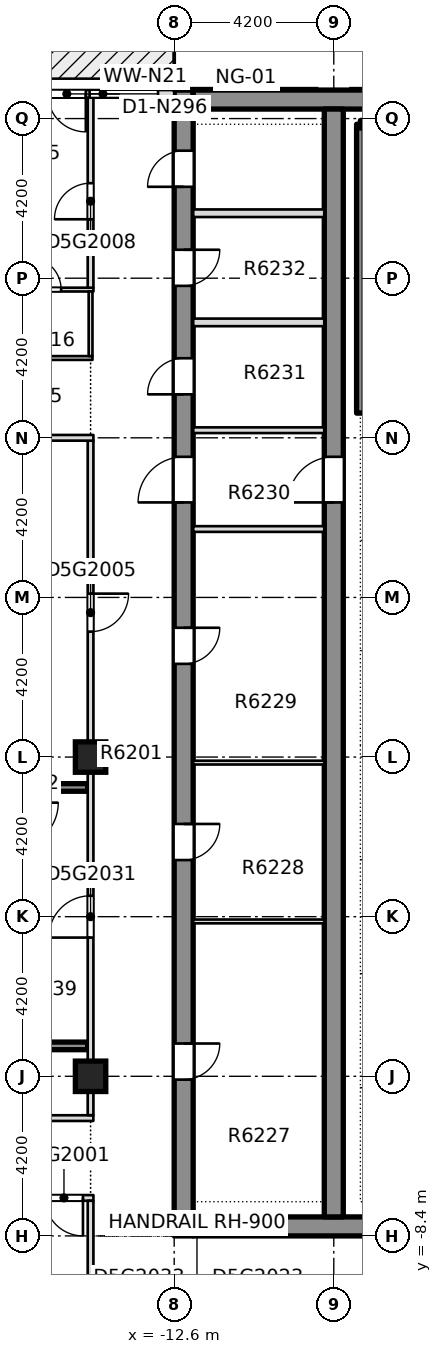
"""IFC4 building model, lengths in metres.
Left out: names, types, materials, properties, quantities, classifications, styles, units other than length and angle.
Written with IfcOpenShell. Run it as: python <this file> out.ifc"""

import sys

from ifc_helpers import new_model, si_unit, direction, frame, frame_2d, origin, origin_2d, place, context, subcontext, project, spatial, rectangle, extrude, element, fill, save


model = new_model("IFC4")
c1 = context("Model", 3, precision=1e-05, world=origin(), true_north=direction((0.0, 1.0)))
c2 = subcontext(c1, "Body", "Model", "MODEL_VIEW")
j1 = project(units=[si_unit("LENGTHUNIT", "METRE"), si_unit("PLANEANGLEUNIT", "RADIAN")], contexts=[c1])
p1 = place(None, origin())
s1 = spatial("IfcSite", under=j1, at=p1, CompositionType="ELEMENT")
p2 = place(p1, origin())
s2 = spatial("IfcBuilding", under=s1, at=p2, CompositionType="ELEMENT")
p3 = place(p2, frame((0.0, 0.0, 237.25)))
s3 = spatial("IfcBuildingStorey", under=s2, at=p3, CompositionType="ELEMENT", Elevation=237.25)
p4 = place(p3, frame((-12.35, -8.4, -0.4), z_axis=(0.0, 0.0, 1.0), x_axis=(0.0, 1.0, 0.0)))
e1 = element("IfcWall", 1, at=p4, inside=s3, PredefinedType="SHEAR", context=c2, shape_type="SweptSolid", body=[
    extrude(rectangle(XDim=30.15, YDim=0.5, at=frame_2d((15.075, 0.0))), origin(), (0.0, 0.0, 1.0), 3.45),
])
p5 = place(p4, frame((4.113, 0.0, 0.4)))
e2 = element("IfcOpeningElement", 2, at=p5, cuts=e1, PredefinedType="OPENING", context=c2, shape_type="SweptSolid", body=[
    extrude(rectangle(XDim=0.95, YDim=2.1, at=frame_2d((0.475, 1.05))), frame((0.0, 0.26, 0.0), z_axis=(0.0, -1.0, 0.0), x_axis=(1.0, 0.0, 0.0)), (0.0, 0.0, 1.0), 0.52),
])
p6 = place(p4, frame((9.89, 0.0, 0.4)))
e3 = element("IfcOpeningElement", 3, at=p6, cuts=e1, PredefinedType="OPENING", context=c2, shape_type="SweptSolid", body=[
    extrude(rectangle(XDim=0.95, YDim=2.1, at=frame_2d((0.475, 1.05))), frame((0.0, 0.26, 0.0), z_axis=(0.0, -1.0, 0.0), x_axis=(1.0, 0.0, 0.0)), (0.0, 0.0, 1.0), 0.52),
])
p7 = place(p4, frame((15.052, 0.0, 0.4)))
e4 = element("IfcOpeningElement", 4, at=p7, cuts=e1, PredefinedType="OPENING", context=c2, shape_type="SweptSolid", body=[
    extrude(rectangle(XDim=0.95, YDim=2.1, at=frame_2d((0.475, 1.05))), frame((0.0, 0.26, 0.0), z_axis=(0.0, -1.0, 0.0), x_axis=(1.0, 0.0, 0.0)), (0.0, 0.0, 1.0), 0.52),
])
p8 = place(p4, frame((22.144, 0.0, 0.4)))
e5 = element("IfcOpeningElement", 5, at=p8, cuts=e1, PredefinedType="OPENING", context=c2, shape_type="SweptSolid", body=[
    extrude(rectangle(XDim=0.95, YDim=2.1, at=frame_2d((0.475, 1.05))), frame((0.0, 0.26, 0.0), z_axis=(0.0, -1.0, 0.0), x_axis=(1.0, 0.0, 0.0)), (0.0, 0.0, 1.0), 0.52),
])
p9 = place(p4, frame((24.998, 0.0, 0.4)))
e6 = element("IfcOpeningElement", 6, at=p9, cuts=e1, PredefinedType="OPENING", context=c2, shape_type="SweptSolid", body=[
    extrude(rectangle(XDim=0.95, YDim=2.1, at=frame_2d((0.475, 1.05))), frame((0.0, 0.26, 0.0), z_axis=(0.0, -1.0, 0.0), x_axis=(1.0, 0.0, 0.0)), (0.0, 0.0, 1.0), 0.52),
])
p10 = place(p4, frame((27.605, 0.0, 0.4)))
e7 = element("IfcOpeningElement", 7, at=p10, cuts=e1, PredefinedType="OPENING", context=c2, shape_type="SweptSolid", body=[
    extrude(rectangle(XDim=0.95, YDim=2.1, at=frame_2d((0.475, 1.05))), frame((0.0, 0.26, 0.0), z_axis=(0.0, -1.0, 0.0), x_axis=(1.0, 0.0, 0.0)), (0.0, 0.0, 1.0), 0.52),
])
p11 = place(p4, frame((19.3, 0.0, 0.4)))
e8 = element("IfcOpeningElement", 8, at=p11, cuts=e1, PredefinedType="OPENING", context=c2, shape_type="SweptSolid", body=[
    extrude(rectangle(XDim=1.2, YDim=2.1, at=frame_2d((0.6, 1.05))), frame((0.0, 0.26, 0.0), z_axis=(0.0, -1.0, 0.0), x_axis=(1.0, 0.0, 0.0)), (0.0, 0.0, 1.0), 0.52),
])
p12 = place(p3, frame((-12.1, -8.15, -0.4), z_axis=(0.0, 0.0, 1.0), x_axis=(1.0, 0.0, 0.0)))
e9 = element("IfcWall", 9, at=p12, inside=s3, PredefinedType="SHEAR", context=c2, shape_type="SweptSolid", body=[
    extrude(rectangle(XDim=24.2, YDim=0.5, at=frame_2d((12.1, 0.0))), origin(), (0.0, 0.0, 1.0), 3.45),
])
p13 = place(p12, frame((7.35, 0.0, 0.4)))
e10 = element("IfcOpeningElement", 10, at=p13, cuts=e9, PredefinedType="OPENING", context=c2, shape_type="SweptSolid", body=[
    extrude(rectangle(XDim=1.8, YDim=2.1, at=frame_2d((0.9, 1.05))), frame((0.0, 0.26, 0.0), z_axis=(0.0, -1.0, 0.0), x_axis=(1.0, 0.0, 0.0)), (0.0, 0.0, 1.0), 0.52),
])
p14 = place(p12, frame((15.05, 0.0, 0.4)))
e11 = element("IfcOpeningElement", 11, at=p14, cuts=e9, PredefinedType="OPENING", context=c2, shape_type="SweptSolid", body=[
    extrude(rectangle(XDim=1.8, YDim=2.1, at=frame_2d((0.9, 1.05))), frame((0.0, 0.26, 0.0), z_axis=(0.0, -1.0, 0.0), x_axis=(1.0, 0.0, 0.0)), (0.0, 0.0, 1.0), 0.52),
])
p15 = place(p3, frame((-12.1, 21.5, -0.4), z_axis=(0.0, 0.0, 1.0), x_axis=(1.0, 0.0, 0.0)))
e12 = element("IfcWall", 12, at=p15, inside=s3, PredefinedType="SHEAR", context=c2, shape_type="SweptSolid", body=[
    extrude(rectangle(XDim=24.2, YDim=0.5, at=frame_2d((12.1, 0.0))), origin(), (0.0, 0.0, 1.0), 3.45),
])
p16 = place(p3, frame((-8.4, -7.9, -0.4), z_axis=(0.0, 0.0, 1.0), x_axis=(0.0, 1.0, 0.0)))
e13 = element("IfcWall", 13, at=p16, inside=s3, PredefinedType="SHEAR", context=c2, shape_type="SweptSolid", body=[
    extrude(rectangle(XDim=29.15, YDim=0.5, at=frame_2d((14.575, 0.0))), origin(), (0.0, 0.0, 1.0), 3.45),
])
p17 = place(p16, frame((18.8, 0.0, 0.4)))
e14 = element("IfcOpeningElement", 14, at=p17, cuts=e13, PredefinedType="OPENING", context=c2, shape_type="SweptSolid", body=[
    extrude(rectangle(XDim=1.2, YDim=2.1, at=frame_2d((0.6, 1.05))), frame((0.0, 0.26, 0.0), z_axis=(0.0, -1.0, 0.0), x_axis=(1.0, 0.0, 0.0)), (0.0, 0.0, 1.0), 0.52),
])
for number, where, z_axis, x_axis in (
    (15, (-14.8, -4.2, -0.4), (0.0, 0.0, 1.0), (1.0, 0.0, 0.0)),
    (16, (-14.8, 4.2, -0.4), (0.0, 0.0, 1.0), (1.0, 0.0, 0.0)),
):
    element("IfcColumn", number, at=place(p3, frame(where, z_axis=z_axis, x_axis=x_axis)), inside=s3, PredefinedType="COLUMN", context=c2, shape_type="SweptSolid", body=[
        extrude(rectangle(XDim=0.8, YDim=0.8, at=origin_2d()), origin(), (0.0, 0.0, 1.0), 3.45),
    ])
p18 = place(p3, frame((-25.75, -7.4, 0.0), z_axis=(0.0, 0.0, 1.0), x_axis=(1.0, 0.0, 0.0)))
e17 = element("IfcWall", 17, at=p18, inside=s3, PredefinedType="PARTITIONING", context=c2, shape_type="SweptSolid", body=[
    extrude(rectangle(XDim=11.025, YDim=0.15, at=frame_2d((5.512, 0.0))), origin(), (0.0, 0.0, 1.0), 3.05),
])
p19 = place(p18, frame((9.75, 0.0, 0.0)))
e18 = element("IfcOpeningElement", 18, at=p19, cuts=e17, PredefinedType="OPENING", context=c2, shape_type="SweptSolid", body=[
    extrude(rectangle(XDim=1.0, YDim=2.1, at=frame_2d((0.5, 1.05))), frame((0.0, 0.085, 0.0), z_axis=(0.0, -1.0, 0.0), x_axis=(1.0, 0.0, 0.0)), (0.0, 0.0, 1.0), 0.17),
])
p20 = place(p3, frame((-25.75, -5.3, 0.0), z_axis=(0.0, 0.0, 1.0), x_axis=(1.0, 0.0, 0.0)))
e19 = element("IfcWall", 19, at=p20, inside=s3, PredefinedType="PARTITIONING", context=c2, shape_type="SweptSolid", body=[
    extrude(rectangle(XDim=11.023, YDim=0.15, at=frame_2d((5.511, 0.0))), origin(), (0.0, 0.0, 1.0), 3.05),
])
p21 = place(p3, frame((-20.4, -3.4, 0.0), z_axis=(0.0, 0.0, 1.0), x_axis=(1.0, 0.0, 0.0)))
e20 = element("IfcWall", 20, at=p21, inside=s3, PredefinedType="SOLIDWALL", context=c2, shape_type="SweptSolid", body=[
    extrude(rectangle(XDim=5.523, YDim=0.2, at=frame_2d((2.761, 0.0))), origin(), (0.0, 0.0, 1.0), 3.05),
])
p22 = place(p3, frame((-20.45, 3.4, 0.0), z_axis=(0.0, 0.0, 1.0), x_axis=(1.0, 0.0, 0.0)))
e21 = element("IfcWall", 21, at=p22, inside=s3, PredefinedType="SOLIDWALL", context=c2, shape_type="SweptSolid", body=[
    extrude(rectangle(XDim=5.575, YDim=0.2, at=frame_2d((2.788, 0.0))), origin(), (0.0, 0.0, 1.0), 3.05),
])
p23 = place(p3, frame((-17.25, 14.7, 0.0), z_axis=(0.0, 0.0, 1.0), x_axis=(1.0, 0.0, 0.0)))
e22 = element("IfcWall", 22, at=p23, inside=s3, PredefinedType="PARTITIONING", context=c2, shape_type="SweptSolid", body=[
    extrude(rectangle(XDim=2.5, YDim=0.1, at=frame_2d((1.25, 0.0))), origin(), (0.0, 0.0, 1.0), 3.05),
])
p24 = place(p3, frame((-17.25, 16.5, 0.0), z_axis=(0.0, 0.0, 1.0), x_axis=(1.0, 0.0, 0.0)))
e23 = element("IfcWall", 23, at=p24, inside=s3, PredefinedType="PARTITIONING", context=c2, shape_type="SweptSolid", body=[
    extrude(rectangle(XDim=2.525, YDim=0.1, at=frame_2d((1.262, 0.0))), origin(), (0.0, 0.0, 1.0), 3.05),
])
p25 = place(p24, frame((0.825, 0.0, 0.0)))
e24 = element("IfcOpeningElement", 24, at=p25, cuts=e23, PredefinedType="OPENING", context=c2, shape_type="SweptSolid", body=[
    extrude(rectangle(XDim=0.85, YDim=2.1, at=frame_2d((0.425, 1.05))), frame((0.0, 0.06, 0.0), z_axis=(0.0, -1.0, 0.0), x_axis=(1.0, 0.0, 0.0)), (0.0, 0.0, 1.0), 0.12),
])
p26 = place(p3, frame((-14.8, -10.525, 0.0), z_axis=(0.0, 0.0, 1.0), x_axis=(0.0, 1.0, 0.0)))
e25 = element("IfcWall", 25, at=p26, inside=s3, PredefinedType="PARTITIONING", context=c2, shape_type="SweptSolid", body=[
    extrude(rectangle(XDim=3.05, YDim=0.15, at=frame_2d((1.525, 0.0))), origin(), (0.0, 0.0, 1.0), 3.05),
])
p27 = place(p3, frame((-14.8, -5.223, 0.0), z_axis=(0.0, 0.0, 1.0), x_axis=(0.0, 1.0, 0.0)))
e26 = element("IfcWall", 26, at=p27, inside=s3, PredefinedType="PARTITIONING", context=c2, shape_type="SweptSolid", body=[
    extrude(rectangle(XDim=17.748, YDim=0.15, at=frame_2d((8.874, 0.0))), origin(), (0.0, 0.0, 1.0), 3.05),
])
p28 = place(p27, frame((12.723, 0.0, 0.0)))
e27 = element("IfcOpeningElement", 27, at=p28, cuts=e26, PredefinedType="OPENING", context=c2, shape_type="SweptSolid", body=[
    extrude(rectangle(XDim=1.0, YDim=2.1, at=frame_2d((0.5, 1.05))), frame((0.0, 0.085, 0.0), z_axis=(0.0, -1.0, 0.0), x_axis=(1.0, 0.0, 0.0)), (0.0, 0.0, 1.0), 0.17),
])
p29 = place(p27, frame((4.673, 0.0, 0.0)))
e28 = element("IfcOpeningElement", 28, at=p29, cuts=e26, PredefinedType="OPENING", context=c2, shape_type="SweptSolid", body=[
    extrude(rectangle(XDim=1.1, YDim=2.1, at=frame_2d((0.55, 1.05))), frame((0.0, 0.085, 0.0), z_axis=(0.0, -1.0, 0.0), x_axis=(1.0, 0.0, 0.0)), (0.0, 0.0, 1.0), 0.17),
])
p30 = place(p3, frame((-14.8, 14.75, 0.0), z_axis=(0.0, 0.0, 1.0), x_axis=(0.0, 1.0, 0.0)))
e29 = element("IfcWall", 29, at=p30, inside=s3, PredefinedType="PARTITIONING", context=c2, shape_type="SweptSolid", body=[
    extrude(rectangle(XDim=1.7, YDim=0.1, at=frame_2d((0.85, 0.0))), origin(), (0.0, 0.0, 1.0), 3.05),
])
p31 = place(p3, frame((-14.8, 16.55, 0.0), z_axis=(0.0, 0.0, 1.0), x_axis=(0.0, 1.0, 0.0)))
e30 = element("IfcWall", 30, at=p31, inside=s3, PredefinedType="PARTITIONING", context=c2, shape_type="SweptSolid", body=[
    extrude(rectangle(XDim=5.0, YDim=0.15, at=frame_2d((2.5, 0.0))), origin(), (0.0, 0.0, 1.0), 3.05),
])
p32 = place(p31, frame((1.8, 0.0, 0.0)))
e31 = element("IfcOpeningElement", 31, at=p32, cuts=e30, PredefinedType="OPENING", context=c2, shape_type="SweptSolid", body=[
    extrude(rectangle(XDim=0.95, YDim=2.1, at=frame_2d((0.475, 1.05))), frame((0.0, 0.085, 0.0), z_axis=(0.0, -1.0, 0.0), x_axis=(1.0, 0.0, 0.0)), (0.0, 0.0, 1.0), 0.17),
])
p33 = place(p3, frame((-12.6, 21.65, 0.0), z_axis=(0.0, 0.0, 1.0), x_axis=(-1.0, 0.0, 0.0)))
e32 = element("IfcWall", 32, at=p33, inside=s3, PredefinedType="STANDARD", context=c2, shape_type="SweptSolid", body=[
    extrude(rectangle(XDim=3.75, YDim=0.2, at=frame_2d((1.875, 0.0))), origin(), (0.0, 0.0, 1.0), 3.05),
])
p34 = place(p33, frame((0.425, 0.0, 0.2)))
e33 = element("IfcOpeningElement", 33, at=p34, cuts=e32, PredefinedType="OPENING", context=c2, shape_type="SweptSolid", body=[
    extrude(rectangle(XDim=1.8, YDim=2.65, at=frame_2d((0.9, 1.325))), frame((0.0, 0.11, 0.0), z_axis=(0.0, -1.0, 0.0), x_axis=(1.0, 0.0, 0.0)), (0.0, 0.0, 1.0), 0.22),
])
p35 = place(p33, frame((2.325, 0.0, 0.0)))
e34 = element("IfcOpeningElement", 34, at=p35, cuts=e32, PredefinedType="OPENING", context=c2, shape_type="SweptSolid", body=[
    extrude(rectangle(XDim=1.0, YDim=2.4, at=frame_2d((0.5, 1.2))), frame((0.0, 0.11, 0.0), z_axis=(0.0, -1.0, 0.0), x_axis=(1.0, 0.0, 0.0)), (0.0, 0.0, 1.0), 0.22),
])
for number, where, z_axis, x_axis in (
    (35, (-12.099, -0.125, 0.0), (0.0, 0.0, 1.0), (1.0, 0.0, 0.0)),
    (36, (-12.099, 4.054, 0.0), (0.0, 0.0, 1.0), (1.0, 0.0, 0.0)),
):
    element("IfcWall", number, at=place(p3, frame(where, z_axis=z_axis, x_axis=x_axis)), inside=s3, PredefinedType="PARTITIONING", context=c2, shape_type="SweptSolid", body=[
        extrude(rectangle(XDim=3.448, YDim=0.1, at=frame_2d((1.724, 0.0))), origin(), (0.0, 0.0, 1.0), 3.05),
    ])
for number, where, z_axis, x_axis in (
    (37, (-12.099, 10.2, 0.0), (0.0, 0.0, 1.0), (1.0, 0.0, 0.0)),
    (38, (-12.099, 12.8, 0.0), (0.0, 0.0, 1.0), (1.0, 0.0, 0.0)),
):
    element("IfcWall", number, at=place(p3, frame(where, z_axis=z_axis, x_axis=x_axis)), inside=s3, PredefinedType="PARTITIONING", context=c2, shape_type="SweptSolid", body=[
        extrude(rectangle(XDim=3.448, YDim=0.15, at=frame_2d((1.724, 0.0))), origin(), (0.0, 0.0, 1.0), 3.05),
    ])
for number, where, z_axis, x_axis in (
    (39, (-12.099, 15.637, 0.0), (0.0, 0.0, 1.0), (1.0, 0.0, 0.0)),
    (40, (-12.099, 18.509, 0.0), (0.0, 0.0, 1.0), (1.0, 0.0, 0.0)),
):
    element("IfcWall", number, at=place(p3, frame(where, z_axis=z_axis, x_axis=x_axis)), inside=s3, PredefinedType="PARTITIONING", context=c2, shape_type="SweptSolid", body=[
        extrude(rectangle(XDim=3.448, YDim=0.2, at=frame_2d((1.724, 0.0))), origin(), (0.0, 0.0, 1.0), 3.05),
    ])
p36 = place(p3, frame((-7.7, 13.25, 0.0), z_axis=(0.0, 0.0, 1.0), x_axis=(0.0, 1.0, 0.0)))
e41 = element("IfcWall", 41, at=p36, inside=s3, PredefinedType="SOLIDWALL", context=c2, shape_type="SweptSolid", body=[
    extrude(rectangle(XDim=7.6, YDim=0.2, at=frame_2d((3.8, 0.0))), origin(), (0.0, 0.0, 1.0), 3.05),
])
p37 = place(p3, frame((-7.7, 20.85, 0.0), z_axis=(0.0, 0.0, 1.0), x_axis=(1.0, 0.0, 0.0)))
e42 = element("IfcWall", 42, at=p37, inside=s3, PredefinedType="SOLIDWALL", context=c2, shape_type="SweptSolid", body=[
    extrude(rectangle(XDim=3.55, YDim=0.2, at=frame_2d((1.775, 0.0))), origin(), (0.0, 0.0, 1.0), 3.05),
])
p38 = place(p3, frame((-17.25, 12.6, 0.0), z_axis=(0.0, 0.0, 1.0), x_axis=(1.0, 0.0, 0.0)))
e43 = element("IfcWall", 43, at=p38, inside=s3, PredefinedType="PARTITIONING", context=c2, shape_type="SweptSolid", body=[
    extrude(rectangle(XDim=2.525, YDim=0.15, at=frame_2d((1.262, 0.0))), origin(), (0.0, 0.0, 1.0), 3.05),
])
p39 = place(p19, origin())
e44 = element("IfcDoor", 44, at=p39, inside=s3, OperationType="SINGLE_SWING_RIGHT", PredefinedType="DOOR", context=c2, shape_type="SweptSolid", body=[
    extrude(rectangle(XDim=1.0, YDim=2.1, at=frame_2d((0.5, 1.05))), frame((0.0, 0.025, 0.0), z_axis=(0.0, -1.0, 0.0), x_axis=(1.0, 0.0, 0.0)), (0.0, 0.0, 1.0), 0.05),
])
fill(e18, e44)
p40 = place(p28, origin())
e45 = element("IfcDoor", 45, at=p40, inside=s3, OperationType="SINGLE_SWING_RIGHT", PredefinedType="DOOR", context=c2, shape_type="SweptSolid", body=[
    extrude(rectangle(XDim=1.0, YDim=2.1, at=frame_2d((0.5, 1.05))), frame((0.0, 0.025, 0.0), z_axis=(0.0, -1.0, 0.0), x_axis=(1.0, 0.0, 0.0)), (0.0, 0.0, 1.0), 0.05),
])
fill(e27, e45)
p41 = place(p32, origin())
e46 = element("IfcDoor", 46, at=p41, inside=s3, OperationType="SINGLE_SWING_RIGHT", PredefinedType="DOOR", context=c2, shape_type="SweptSolid", body=[
    extrude(rectangle(XDim=0.95, YDim=2.1, at=frame_2d((0.475, 1.05))), frame((0.0, 0.025, 0.0), z_axis=(0.0, -1.0, 0.0), x_axis=(1.0, 0.0, 0.0)), (0.0, 0.0, 1.0), 0.05),
])
fill(e31, e46)
p42 = place(p25, origin())
e47 = element("IfcDoor", 47, at=p42, inside=s3, OperationType="SINGLE_SWING_RIGHT", PredefinedType="DOOR", context=c2, shape_type="SweptSolid", body=[
    extrude(rectangle(XDim=0.85, YDim=2.1, at=frame_2d((0.425, 1.05))), frame((0.0, 0.025, 0.0), z_axis=(0.0, -1.0, 0.0), x_axis=(1.0, 0.0, 0.0)), (0.0, 0.0, 1.0), 0.05),
])
fill(e24, e47)
p43 = place(p29, origin())
e48 = element("IfcDoor", 48, at=p43, inside=s3, OperationType="SINGLE_SWING_LEFT", PredefinedType="DOOR", context=c2, shape_type="SweptSolid", body=[
    extrude(rectangle(XDim=1.1, YDim=2.1, at=frame_2d((0.55, 1.05))), frame((0.0, 0.025, 0.0), z_axis=(0.0, -1.0, 0.0), x_axis=(1.0, 0.0, 0.0)), (0.0, 0.0, 1.0), 0.05),
])
fill(e28, e48)
p44 = place(p34, origin())
e49 = element("IfcWindow", 49, at=p44, inside=s3, PartitioningType="SINGLE_PANEL", PredefinedType="WINDOW", context=c2, shape_type="SweptSolid", body=[
    extrude(rectangle(XDim=1.8, YDim=2.65, at=frame_2d((0.9, 1.325))), frame((0.0, 0.03, 0.0), z_axis=(0.0, -1.0, 0.0), x_axis=(1.0, 0.0, 0.0)), (0.0, 0.0, 1.0), 0.06),
])
fill(e33, e49)
p45 = place(p35, origin())
e50 = element("IfcDoor", 50, at=p45, inside=s3, OperationType="SINGLE_SWING_LEFT", PredefinedType="DOOR", context=c2, shape_type="SweptSolid", body=[
    extrude(rectangle(XDim=1.0, YDim=2.4, at=frame_2d((0.5, 1.2))), frame((0.0, 0.025, 0.0), z_axis=(0.0, -1.0, 0.0), x_axis=(1.0, 0.0, 0.0)), (0.0, 0.0, 1.0), 0.05),
])
fill(e34, e50)
p46 = place(p5, origin())
e51 = element("IfcDoor", 51, at=p46, inside=s3, OperationType="SINGLE_SWING_LEFT", PredefinedType="DOOR", context=c2, shape_type="SweptSolid", body=[
    extrude(rectangle(XDim=0.95, YDim=2.1, at=frame_2d((0.475, 1.05))), frame((0.0, 0.025, 0.0), z_axis=(0.0, -1.0, 0.0), x_axis=(1.0, 0.0, 0.0)), (0.0, 0.0, 1.0), 0.05),
])
fill(e2, e51)
p47 = place(p6, origin())
e52 = element("IfcDoor", 52, at=p47, inside=s3, OperationType="SINGLE_SWING_LEFT", PredefinedType="DOOR", context=c2, shape_type="SweptSolid", body=[
    extrude(rectangle(XDim=0.95, YDim=2.1, at=frame_2d((0.475, 1.05))), frame((0.0, 0.025, 0.0), z_axis=(0.0, -1.0, 0.0), x_axis=(1.0, 0.0, 0.0)), (0.0, 0.0, 1.0), 0.05),
])
fill(e3, e52)
p48 = place(p7, origin())
e53 = element("IfcDoor", 53, at=p48, inside=s3, OperationType="SINGLE_SWING_LEFT", PredefinedType="DOOR", context=c2, shape_type="SweptSolid", body=[
    extrude(rectangle(XDim=0.95, YDim=2.1, at=frame_2d((0.475, 1.05))), frame((0.0, 0.025, 0.0), z_axis=(0.0, -1.0, 0.0), x_axis=(1.0, 0.0, 0.0)), (0.0, 0.0, 1.0), 0.05),
])
fill(e4, e53)
p49 = place(p8, origin())
e54 = element("IfcDoor", 54, at=p49, inside=s3, OperationType="SINGLE_SWING_LEFT", PredefinedType="DOOR", context=c2, shape_type="SweptSolid", body=[
    extrude(rectangle(XDim=0.95, YDim=2.1, at=frame_2d((0.475, 1.05))), frame((0.0, 0.025, 0.0), z_axis=(0.0, -1.0, 0.0), x_axis=(1.0, 0.0, 0.0)), (0.0, 0.0, 1.0), 0.05),
])
fill(e5, e54)
p50 = place(p9, origin())
e55 = element("IfcDoor", 55, at=p50, inside=s3, OperationType="SINGLE_SWING_LEFT", PredefinedType="DOOR", context=c2, shape_type="SweptSolid", body=[
    extrude(rectangle(XDim=0.95, YDim=2.1, at=frame_2d((0.475, 1.05))), frame((0.0, 0.025, 0.0), z_axis=(0.0, -1.0, 0.0), x_axis=(1.0, 0.0, 0.0)), (0.0, 0.0, 1.0), 0.05),
])
fill(e6, e55)
p51 = place(p10, origin())
e56 = element("IfcDoor", 56, at=p51, inside=s3, OperationType="SINGLE_SWING_LEFT", PredefinedType="DOOR", context=c2, shape_type="SweptSolid", body=[
    extrude(rectangle(XDim=0.95, YDim=2.1, at=frame_2d((0.475, 1.05))), frame((0.0, 0.025, 0.0), z_axis=(0.0, -1.0, 0.0), x_axis=(1.0, 0.0, 0.0)), (0.0, 0.0, 1.0), 0.05),
])
fill(e7, e56)
p52 = place(p11, origin())
e57 = element("IfcDoor", 57, at=p52, inside=s3, OperationType="SINGLE_SWING_LEFT", PredefinedType="DOOR", context=c2, shape_type="SweptSolid", body=[
    extrude(rectangle(XDim=1.2, YDim=2.1, at=frame_2d((0.6, 1.05))), frame((0.0, 0.025, 0.0), z_axis=(0.0, -1.0, 0.0), x_axis=(1.0, 0.0, 0.0)), (0.0, 0.0, 1.0), 0.05),
])
fill(e8, e57)
p53 = place(p17, origin())
e58 = element("IfcDoor", 58, at=p53, inside=s3, OperationType="SINGLE_SWING_LEFT", PredefinedType="DOOR", context=c2, shape_type="SweptSolid", body=[
    extrude(rectangle(XDim=1.2, YDim=2.1, at=frame_2d((0.6, 1.05))), frame((0.0, 0.025, 0.0), z_axis=(0.0, -1.0, 0.0), x_axis=(1.0, 0.0, 0.0)), (0.0, 0.0, 1.0), 0.05),
])
fill(e14, e58)
save(model, sys.argv[1])
